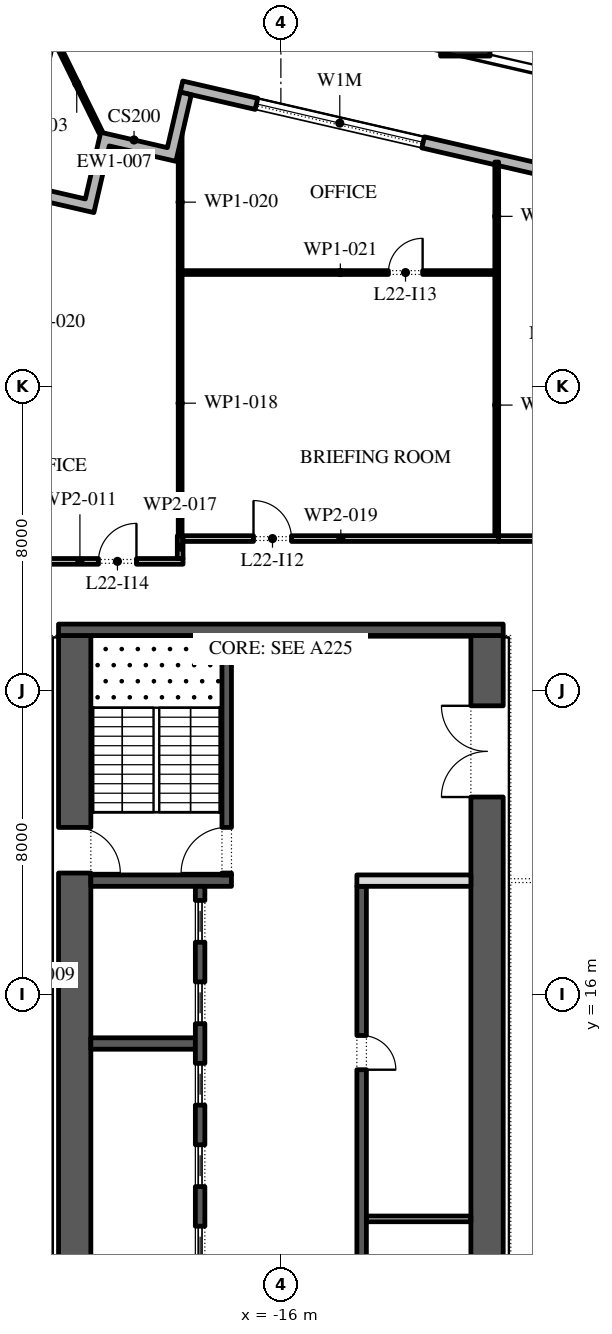
"""IFC4 building model, lengths in metres.
Left out: names, types, materials, properties, quantities, classifications, styles, units other than length and angle.
Written with IfcOpenShell. Run it as: python <this file> out.ifc"""

import sys

from ifc_helpers import new_model, si_unit, direction, frame, frame_2d, origin, origin_2d, place, context, subcontext, project, spatial, polyline, rectangle, outline, extrude, element, fill, save


model = new_model("IFC4")
c1 = context("Model", 3, precision=1e-05, world=origin(), true_north=direction((0.0, 1.0)))
c2 = subcontext(c1, "Body", "Model", "MODEL_VIEW")
j1 = project(units=[si_unit("LENGTHUNIT", "METRE"), si_unit("PLANEANGLEUNIT", "RADIAN")], contexts=[c1])
p1 = place(None, origin())
s1 = spatial("IfcSite", under=j1, at=p1, CompositionType="ELEMENT")
p2 = place(p1, origin())
s2 = spatial("IfcBuilding", under=s1, at=p2, CompositionType="ELEMENT")
p3 = place(p2, frame((0.0, 0.0, 105.6)))
s3 = spatial("IfcBuildingStorey", under=s2, at=p3, CompositionType="ELEMENT", Elevation=105.6)
p4 = place(p3, frame((-11.147, 41.346, 0.0), z_axis=(0.020377597275, 0.088167842757, 0.995897175934), x_axis=(-0.97431566651, 0.225186549318, 0.0)))
e1 = element("IfcColumn", 1, at=p4, inside=s3, PredefinedType="COLUMN", context=c2, shape_type="SweptSolid", body=[
    extrude(rectangle(XDim=1.3, YDim=1.3, at=origin_2d()), origin(), (0.0, 0.0, 1.0), 4.217),
])
p5 = place(p3, frame((31.078, 28.421, 0.0), z_axis=(0.0, 0.0, 1.0), x_axis=(-0.974370456532, 0.224949357493, 0.0)))
e2 = element("IfcWall", 2, at=p5, inside=s3, PredefinedType="STANDARD", context=c2, shape_type="SweptSolid", body=[
    extrude(rectangle(XDim=51.0, YDim=0.3, at=frame_2d((25.5, 0.0))), origin(), (0.0, 0.0, 1.0), 4.0),
])
p6 = place(p5, frame((1.875, 0.0, 0.45)))
e3 = element("IfcOpeningElement", 3, at=p6, cuts=e2, PredefinedType="OPENING", context=c2, shape_type="SweptSolid", body=[
    extrude(rectangle(XDim=4.5, YDim=3.05, at=frame_2d((2.25, 1.525))), frame((0.0, 0.16, 0.0), z_axis=(0.0, -1.0, 0.0), x_axis=(1.0, 0.0, 0.0)), (0.0, 0.0, 1.0), 0.32),
])
p7 = place(p5, frame((10.275, 0.0, 0.45)))
e4 = element("IfcOpeningElement", 4, at=p7, cuts=e2, PredefinedType="OPENING", context=c2, shape_type="SweptSolid", body=[
    extrude(rectangle(XDim=4.5, YDim=2.95, at=frame_2d((2.25, 1.475))), frame((0.0, 0.16, 0.0), z_axis=(0.0, -1.0, 0.0), x_axis=(1.0, 0.0, 0.0)), (0.0, 0.0, 1.0), 0.32),
])
p8 = place(p5, frame((18.825, 0.0, 0.45)))
e5 = element("IfcOpeningElement", 5, at=p8, cuts=e2, PredefinedType="OPENING", context=c2, shape_type="SweptSolid", body=[
    extrude(rectangle(XDim=4.5, YDim=2.875, at=frame_2d((2.25, 1.438))), frame((0.0, 0.16, 0.0), z_axis=(0.0, -1.0, 0.0), x_axis=(1.0, 0.0, 0.0)), (0.0, 0.0, 1.0), 0.32),
])
p9 = place(p5, frame((27.075, 0.0, 0.0)))
e6 = element("IfcOpeningElement", 6, at=p9, cuts=e2, PredefinedType="OPENING", context=c2, shape_type="SweptSolid", body=[
    extrude(rectangle(XDim=2.4, YDim=3.25, at=frame_2d((1.2, 1.625))), frame((0.0, 0.16, 0.0), z_axis=(0.0, -1.0, 0.0), x_axis=(1.0, 0.0, 0.0)), (0.0, 0.0, 1.0), 0.32),
])
p10 = place(p5, frame((35.925, 0.0, 0.45)))
e7 = element("IfcOpeningElement", 7, at=p10, cuts=e2, PredefinedType="OPENING", context=c2, shape_type="SweptSolid", body=[
    extrude(rectangle(XDim=4.5, YDim=2.675, at=frame_2d((2.25, 1.337))), frame((0.0, 0.16, 0.0), z_axis=(0.0, -1.0, 0.0), x_axis=(1.0, 0.0, 0.0)), (0.0, 0.0, 1.0), 0.32),
])
p11 = place(p5, frame((44.475, 0.0, 0.45)))
e8 = element("IfcOpeningElement", 8, at=p11, cuts=e2, PredefinedType="OPENING", context=c2, shape_type="SweptSolid", body=[
    extrude(rectangle(XDim=4.5, YDim=2.575, at=frame_2d((2.25, 1.288))), frame((0.0, 0.16, 0.0), z_axis=(0.0, -1.0, 0.0), x_axis=(1.0, 0.0, 0.0)), (0.0, 0.0, 1.0), 0.32),
])
p12 = place(p3, origin())
e9 = element("IfcWall", 9, at=p12, inside=s3, PredefinedType="STANDARD", context=c2, shape_type="SweptSolid", body=[
    extrude(outline(polyline([(-22.967, 37.049), (-22.899, 37.342), (-21.145, 36.937), (-20.74, 38.691), (-18.986, 38.286), (-18.649, 39.747), (-18.357, 39.68), (-18.762, 37.926), (-20.515, 38.331), (-20.92, 36.577), (-22.967, 37.049)])), origin(), (0.0, 0.0, 1.0), 4.0),
])
p13 = place(p3, frame((-20.74, 38.691, -0.05), z_axis=(0.0, 0.0, 1.0), x_axis=(-0.441125841368, 0.897445258541, 0.0)))
e10 = element("IfcWall", 10, at=p13, inside=s3, PredefinedType="STANDARD", context=c2, shape_type="SweptSolid", body=[
    extrude(rectangle(XDim=2.86, YDim=0.1, at=frame_2d((1.43, 0.0))), origin(), (0.0, 0.0, 1.0), 4.05),
])
p14 = place(p3, frame((-21.425, -2.45, 0.0), z_axis=(0.0, 0.0, 1.0), x_axis=(0.0, 1.0, 0.0)))
e11 = element("IfcWall", 11, at=p14, inside=s3, PredefinedType="SHEAR", context=c2, shape_type="SweptSolid", body=[
    extrude(rectangle(XDim=27.9, YDim=0.85, at=frame_2d((13.95, 0.0))), origin(), (0.0, 0.0, 1.0), 4.0),
])
p15 = place(p14, frame((5.05, 0.0, 0.0)))
e12 = element("IfcOpeningElement", 12, at=p15, cuts=e11, PredefinedType="OPENING", context=c2, shape_type="SweptSolid", body=[
    extrude(rectangle(XDim=1.2, YDim=2.1, at=frame_2d((0.6, 1.05))), frame((0.0, 0.435, 0.0), z_axis=(0.0, -1.0, 0.0), x_axis=(1.0, 0.0, 0.0)), (0.0, 0.0, 1.0), 0.87),
])
p16 = place(p14, frame((21.65, 0.0, 0.0)))
e13 = element("IfcOpeningElement", 13, at=p16, cuts=e11, PredefinedType="OPENING", context=c2, shape_type="SweptSolid", body=[
    extrude(rectangle(XDim=1.2, YDim=2.1, at=frame_2d((0.6, 1.05))), frame((0.0, 0.435, 0.0), z_axis=(0.0, -1.0, 0.0), x_axis=(1.0, 0.0, 0.0)), (0.0, 0.0, 1.0), 0.87),
])
p17 = place(p3, frame((-10.575, -2.45, 0.0), z_axis=(0.0, 0.0, 1.0), x_axis=(0.0, 1.0, 0.0)))
e14 = element("IfcWall", 14, at=p17, inside=s3, PredefinedType="SHEAR", context=c2, shape_type="SweptSolid", body=[
    extrude(rectangle(XDim=27.9, YDim=0.85, at=frame_2d((13.95, 0.0))), origin(), (0.0, 0.0, 1.0), 4.0),
])
p18 = place(p17, frame((23.65, 0.0, 0.0)))
e15 = element("IfcOpeningElement", 15, at=p18, cuts=e14, PredefinedType="OPENING", context=c2, shape_type="SweptSolid", body=[
    extrude(rectangle(XDim=2.4, YDim=2.1, at=frame_2d((1.2, 1.05))), frame((0.0, 0.435, 0.0), z_axis=(0.0, -1.0, 0.0), x_axis=(1.0, 0.0, 0.0)), (0.0, 0.0, 1.0), 0.87),
])
p19 = place(p17, frame((1.087, 0.0, 0.0)))
e16 = element("IfcOpeningElement", 16, at=p19, cuts=e14, PredefinedType="OPENING", context=c2, shape_type="SweptSolid", body=[
    extrude(rectangle(XDim=0.9, YDim=2.1, at=frame_2d((0.45, 1.05))), frame((0.0, 0.435, 0.0), z_axis=(0.0, -1.0, 0.0), x_axis=(1.0, 0.0, 0.0)), (0.0, 0.0, 1.0), 0.87),
])
p20 = place(p17, frame((4.262, 0.0, 0.0)))
e17 = element("IfcOpeningElement", 17, at=p20, cuts=e14, PredefinedType="OPENING", context=c2, shape_type="SweptSolid", body=[
    extrude(rectangle(XDim=1.0, YDim=2.1, at=frame_2d((0.5, 1.05))), frame((0.0, 0.435, 0.0), z_axis=(0.0, -1.0, 0.0), x_axis=(1.0, 0.0, 0.0)), (0.0, 0.0, 1.0), 0.87),
])
p21 = place(p3, frame((-21.85, 25.6, 0.0), z_axis=(0.0, 0.0, 1.0), x_axis=(1.0, 0.0, 0.0)))
e18 = element("IfcWall", 18, at=p21, inside=s3, PredefinedType="SHEAR", context=c2, shape_type="SweptSolid", body=[
    extrude(rectangle(XDim=11.7, YDim=0.3, at=frame_2d((5.85, 0.0))), origin(), (0.0, 0.0, 1.0), 4.0),
])
p22 = place(p3, frame((-21.0, 19.0, 0.0), z_axis=(0.0, 0.0, 1.0), x_axis=(1.0, 0.0, 0.0)))
e19 = element("IfcWall", 19, at=p22, inside=s3, PredefinedType="SHEAR", context=c2, shape_type="SweptSolid", body=[
    extrude(rectangle(XDim=3.7, YDim=0.3, at=frame_2d((1.85, 0.0))), origin(), (0.0, 0.0, 1.0), 4.0),
])
p23 = place(p3, frame((-17.425, 19.15, 0.0), z_axis=(0.0, 0.0, 1.0), x_axis=(0.0, 1.0, 0.0)))
e20 = element("IfcWall", 20, at=p23, inside=s3, PredefinedType="SHEAR", context=c2, shape_type="SweptSolid", body=[
    extrude(rectangle(XDim=6.3, YDim=0.25, at=frame_2d((3.15, 0.0))), origin(), (0.0, 0.0, 1.0), 4.0),
])
p24 = place(p23, frame((0.05, 0.0, 0.0)))
e21 = element("IfcOpeningElement", 21, at=p24, cuts=e20, PredefinedType="OPENING", context=c2, shape_type="SweptSolid", body=[
    extrude(rectangle(XDim=1.2, YDim=2.1, at=frame_2d((0.6, 1.05))), frame((0.0, 0.135, 0.0), z_axis=(0.0, -1.0, 0.0), x_axis=(1.0, 0.0, 0.0)), (0.0, 0.0, 1.0), 0.27),
])
p25 = place(p3, frame((-21.0, 14.714, 0.0), z_axis=(0.0, 0.0, 1.0), x_axis=(1.0, 0.0, 0.0)))
e22 = element("IfcWall", 22, at=p25, inside=s3, PredefinedType="SHEAR", context=c2, shape_type="SweptSolid", body=[
    extrude(rectangle(XDim=2.75, YDim=0.3, at=frame_2d((1.375, 0.0))), origin(), (0.0, 0.0, 1.0), 4.0),
])
p26 = place(p3, frame((-18.125, 4.15, 0.0), z_axis=(0.0, 0.0, 1.0), x_axis=(0.0, 1.0, 0.0)))
e23 = element("IfcWall", 23, at=p26, inside=s3, PredefinedType="SHEAR", context=c2, shape_type="SweptSolid", body=[
    extrude(rectangle(XDim=14.7, YDim=0.25, at=frame_2d((7.35, 0.0))), origin(), (0.0, 0.0, 1.0), 4.0),
])
p27 = place(p26, frame((0.371, 0.0, 0.0)))
e24 = element("IfcOpeningElement", 24, at=p27, cuts=e23, PredefinedType="OPENING", context=c2, shape_type="SweptSolid", body=[
    extrude(rectangle(XDim=1.1, YDim=2.1, at=frame_2d((0.55, 1.05))), frame((0.0, 0.135, 0.0), z_axis=(0.0, -1.0, 0.0), x_axis=(1.0, 0.0, 0.0)), (0.0, 0.0, 1.0), 0.27),
])
p28 = place(p26, frame((2.514, 0.0, 0.0)))
e25 = element("IfcOpeningElement", 25, at=p28, cuts=e23, PredefinedType="OPENING", context=c2, shape_type="SweptSolid", body=[
    extrude(rectangle(XDim=1.1, YDim=2.1, at=frame_2d((0.55, 1.05))), frame((0.0, 0.135, 0.0), z_axis=(0.0, -1.0, 0.0), x_axis=(1.0, 0.0, 0.0)), (0.0, 0.0, 1.0), 0.27),
])
p29 = place(p26, frame((4.657, 0.0, 0.0)))
e26 = element("IfcOpeningElement", 26, at=p29, cuts=e23, PredefinedType="OPENING", context=c2, shape_type="SweptSolid", body=[
    extrude(rectangle(XDim=1.1, YDim=2.1, at=frame_2d((0.55, 1.05))), frame((0.0, 0.135, 0.0), z_axis=(0.0, -1.0, 0.0), x_axis=(1.0, 0.0, 0.0)), (0.0, 0.0, 1.0), 0.27),
])
p30 = place(p26, frame((6.8, 0.0, 0.0)))
e27 = element("IfcOpeningElement", 27, at=p30, cuts=e23, PredefinedType="OPENING", context=c2, shape_type="SweptSolid", body=[
    extrude(rectangle(XDim=1.1, YDim=2.1, at=frame_2d((0.55, 1.05))), frame((0.0, 0.135, 0.0), z_axis=(0.0, -1.0, 0.0), x_axis=(1.0, 0.0, 0.0)), (0.0, 0.0, 1.0), 0.27),
])
p31 = place(p26, frame((8.943, 0.0, 0.0)))
e28 = element("IfcOpeningElement", 28, at=p31, cuts=e23, PredefinedType="OPENING", context=c2, shape_type="SweptSolid", body=[
    extrude(rectangle(XDim=1.1, YDim=2.1, at=frame_2d((0.55, 1.05))), frame((0.0, 0.135, 0.0), z_axis=(0.0, -1.0, 0.0), x_axis=(1.0, 0.0, 0.0)), (0.0, 0.0, 1.0), 0.27),
])
p32 = place(p26, frame((11.086, 0.0, 0.0)))
e29 = element("IfcOpeningElement", 29, at=p32, cuts=e23, PredefinedType="OPENING", context=c2, shape_type="SweptSolid", body=[
    extrude(rectangle(XDim=1.1, YDim=2.1, at=frame_2d((0.55, 1.05))), frame((0.0, 0.135, 0.0), z_axis=(0.0, -1.0, 0.0), x_axis=(1.0, 0.0, 0.0)), (0.0, 0.0, 1.0), 0.27),
])
p33 = place(p26, frame((13.229, 0.0, 0.0)))
e30 = element("IfcOpeningElement", 30, at=p33, cuts=e23, PredefinedType="OPENING", context=c2, shape_type="SweptSolid", body=[
    extrude(rectangle(XDim=1.1, YDim=2.1, at=frame_2d((0.55, 1.05))), frame((0.0, 0.135, 0.0), z_axis=(0.0, -1.0, 0.0), x_axis=(1.0, 0.0, 0.0)), (0.0, 0.0, 1.0), 0.27),
])
p34 = place(p3, frame((-13.875, -2.45, 0.0), z_axis=(0.0, 0.0, 1.0), x_axis=(0.0, 1.0, 0.0)))
e31 = element("IfcWall", 31, at=p34, inside=s3, PredefinedType="SHEAR", context=c2, shape_type="SweptSolid", body=[
    extrude(rectangle(XDim=21.3, YDim=0.25, at=frame_2d((10.65, 0.0))), origin(), (0.0, 0.0, 1.0), 4.0),
])
p35 = place(p34, frame((10.196, 0.0, 0.0)))
e32 = element("IfcOpeningElement", 32, at=p35, cuts=e31, PredefinedType="OPENING", context=c2, shape_type="SweptSolid", body=[
    extrude(rectangle(XDim=0.9, YDim=2.1, at=frame_2d((0.45, 1.05))), frame((0.0, 0.135, 0.0), z_axis=(0.0, -1.0, 0.0), x_axis=(1.0, 0.0, 0.0)), (0.0, 0.0, 1.0), 0.27),
])
p36 = place(p34, frame((16.475, 0.0, 0.0)))
e33 = element("IfcOpeningElement", 33, at=p36, cuts=e31, PredefinedType="OPENING", context=c2, shape_type="SweptSolid", body=[
    extrude(rectangle(XDim=0.9, YDim=2.1, at=frame_2d((0.45, 1.05))), frame((0.0, 0.135, 0.0), z_axis=(0.0, -1.0, 0.0), x_axis=(1.0, 0.0, 0.0)), (0.0, 0.0, 1.0), 0.27),
])
p37 = place(p34, frame((6.971, 0.0, 0.0)))
e34 = element("IfcOpeningElement", 34, at=p37, cuts=e31, PredefinedType="OPENING", context=c2, shape_type="SweptSolid", body=[
    extrude(rectangle(XDim=1.1, YDim=2.1, at=frame_2d((0.55, 1.05))), frame((0.0, 0.135, 0.0), z_axis=(0.0, -1.0, 0.0), x_axis=(1.0, 0.0, 0.0)), (0.0, 0.0, 1.0), 0.27),
])
p38 = place(p3, frame((-14.0, 19.0, 0.0), z_axis=(0.0, 0.0, 1.0), x_axis=(1.0, 0.0, 0.0)))
e35 = element("IfcWall", 35, at=p38, inside=s3, PredefinedType="PARTITIONING", context=c2, shape_type="SweptSolid", body=[
    extrude(rectangle(XDim=3.0, YDim=0.3, at=frame_2d((1.5, 0.0))), origin(), (0.0, 0.0, 1.0), 4.0),
])
p39 = place(p3, frame((-13.75, 10.1, 0.0), z_axis=(0.0, 0.0, 1.0), x_axis=(1.0, 0.0, 0.0)))
e36 = element("IfcWall", 36, at=p39, inside=s3, PredefinedType="PARTITIONING", context=c2, shape_type="SweptSolid", body=[
    extrude(rectangle(XDim=2.75, YDim=0.15, at=frame_2d((1.375, 0.0))), origin(), (0.0, 0.0, 1.0), 4.0),
])
p40 = place(p3, frame((-24.0, 27.4, 0.0), z_axis=(0.0, 0.0, 1.0), x_axis=(1.0, 0.0, 0.0)))
e37 = element("IfcWall", 37, at=p40, inside=s3, PredefinedType="PARTITIONING", context=c2, shape_type="SweptSolid", body=[
    extrude(rectangle(XDim=5.425, YDim=0.15, at=frame_2d((2.712, 0.0))), origin(), (0.0, 0.0, 1.0), 4.0),
])
p41 = place(p40, frame((3.2, 0.0, 0.0)))
e38 = element("IfcOpeningElement", 38, at=p41, cuts=e37, PredefinedType="OPENING", context=c2, shape_type="SweptSolid", body=[
    extrude(rectangle(XDim=1.0, YDim=2.1, at=frame_2d((0.5, 1.05))), frame((0.0, 0.085, 0.0), z_axis=(0.0, -1.0, 0.0), x_axis=(1.0, 0.0, 0.0)), (0.0, 0.0, 1.0), 0.17),
])
p42 = place(p3, frame((-18.65, 27.475, 0.0), z_axis=(0.0, 0.0, 1.0), x_axis=(0.0, 1.0, 0.0)))
e39 = element("IfcWall", 39, at=p42, inside=s3, PredefinedType="PARTITIONING", context=c2, shape_type="SweptSolid", body=[
    extrude(rectangle(XDim=0.6, YDim=0.15, at=frame_2d((0.3, 0.0))), origin(), (0.0, 0.0, 1.0), 4.0),
])
p43 = place(p3, frame((-18.65, 28.075, 0.0), z_axis=(0.0, 0.0, 1.0), x_axis=(0.0, 1.0, 0.0)))
e40 = element("IfcWall", 40, at=p43, inside=s3, PredefinedType="PARTITIONING", context=c2, shape_type="SweptSolid", body=[
    extrude(rectangle(XDim=6.975, YDim=0.1, at=frame_2d((3.488, 0.0))), origin(), (0.0, 0.0, 1.0), 4.0),
])
p44 = place(p3, frame((-18.575, 28.0, 0.0), z_axis=(0.0, 0.0, 1.0), x_axis=(1.0, 0.0, 0.0)))
e41 = element("IfcWall", 41, at=p44, inside=s3, PredefinedType="PARTITIONING", context=c2, shape_type="SweptSolid", body=[
    extrude(rectangle(XDim=8.305, YDim=0.15, at=frame_2d((4.152, 0.0))), origin(), (0.0, 0.0, 1.0), 4.0),
])
p45 = place(p44, frame((1.855, 0.0, 0.0)))
e42 = element("IfcOpeningElement", 42, at=p45, cuts=e41, PredefinedType="OPENING", context=c2, shape_type="SweptSolid", body=[
    extrude(rectangle(XDim=1.0, YDim=2.1, at=frame_2d((0.5, 1.05))), frame((0.0, 0.085, 0.0), z_axis=(0.0, -1.0, 0.0), x_axis=(1.0, 0.0, 0.0)), (0.0, 0.0, 1.0), 0.17),
])
p46 = place(p3, frame((-18.65, 35.05, 0.0), z_axis=(0.0, 0.0, 1.0), x_axis=(0.0, 1.0, 0.0)))
e43 = element("IfcWall", 43, at=p46, inside=s3, PredefinedType="PARTITIONING", context=c2, shape_type="SweptSolid", body=[
    extrude(rectangle(XDim=3.604, YDim=0.1, at=frame_2d((1.802, 0.0))), origin(), (0.0, 0.0, 1.0), 4.0),
])
p47 = place(p3, frame((-18.6, 35.0, 0.0), z_axis=(0.0, 0.0, 1.0), x_axis=(1.0, 0.0, 0.0)))
e44 = element("IfcWall", 44, at=p47, inside=s3, PredefinedType="PARTITIONING", context=c2, shape_type="SweptSolid", body=[
    extrude(rectangle(XDim=8.33, YDim=0.1, at=frame_2d((4.165, 0.0))), origin(), (0.0, 0.0, 1.0), 4.0),
])
p48 = place(p47, frame((5.43, 0.0, 0.0)))
e45 = element("IfcOpeningElement", 45, at=p48, cuts=e44, PredefinedType="OPENING", context=c2, shape_type="SweptSolid", body=[
    extrude(rectangle(XDim=0.9, YDim=2.1, at=frame_2d((0.45, 1.05))), frame((0.0, 0.06, 0.0), z_axis=(0.0, -1.0, 0.0), x_axis=(1.0, 0.0, 0.0)), (0.0, 0.0, 1.0), 0.12),
])
p49 = place(p3, frame((-10.32, 28.075, 0.0), z_axis=(0.0, 0.0, 1.0), x_axis=(0.0, 1.0, 0.0)))
e46 = element("IfcWall", 46, at=p49, inside=s3, PredefinedType="PARTITIONING", context=c2, shape_type="SweptSolid", body=[
    extrude(rectangle(XDim=6.875, YDim=0.1, at=frame_2d((3.438, 0.0))), origin(), (0.0, 0.0, 1.0), 4.0),
])
p50 = place(p3, frame((-10.27, 28.0, 0.0), z_axis=(0.0, 0.0, 1.0), x_axis=(1.0, 0.0, 0.0)))
e47 = element("IfcWall", 47, at=p50, inside=s3, PredefinedType="PARTITIONING", context=c2, shape_type="SweptSolid", body=[
    extrude(rectangle(XDim=4.005, YDim=0.15, at=frame_2d((2.002, 0.0))), origin(), (0.0, 0.0, 1.0), 4.0),
])
p51 = place(p50, frame((1.78, 0.0, 0.0)))
e48 = element("IfcOpeningElement", 48, at=p51, cuts=e47, PredefinedType="OPENING", context=c2, shape_type="SweptSolid", body=[
    extrude(rectangle(XDim=1.0, YDim=2.1, at=frame_2d((0.5, 1.05))), frame((0.0, 0.085, 0.0), z_axis=(0.0, -1.0, 0.0), x_axis=(1.0, 0.0, 0.0)), (0.0, 0.0, 1.0), 0.17),
])
p52 = place(p3, frame((-10.32, 35.05, 0.0), z_axis=(0.0, 0.0, 1.0), x_axis=(0.0, 1.0, 0.0)))
e49 = element("IfcWall", 49, at=p52, inside=s3, PredefinedType="PARTITIONING", context=c2, shape_type="SweptSolid", body=[
    extrude(rectangle(XDim=2.857, YDim=0.1, at=frame_2d((1.428, 0.0))), origin(), (0.0, 0.0, 1.0), 4.0),
])
p53 = place(p11, origin())
e50 = element("IfcWindow", 50, at=p53, inside=s3, PartitioningType="DOUBLE_PANEL_VERTICAL", PredefinedType="WINDOW", context=c2, shape_type="SweptSolid", body=[
    extrude(rectangle(XDim=4.5, YDim=2.575, at=frame_2d((2.25, 1.288))), frame((0.0, 0.03, 0.0), z_axis=(0.0, -1.0, 0.0), x_axis=(1.0, 0.0, 0.0)), (0.0, 0.0, 1.0), 0.06),
])
fill(e8, e50)
p54 = place(p29, origin())
e51 = element("IfcDoor", 51, at=p54, inside=s3, OperationType="SLIDING_TO_LEFT", PredefinedType="DOOR", context=c2, shape_type="SweptSolid", body=[
    extrude(rectangle(XDim=1.1, YDim=2.1, at=frame_2d((0.55, 1.05))), frame((0.0, 0.025, 0.0), z_axis=(0.0, -1.0, 0.0), x_axis=(1.0, 0.0, 0.0)), (0.0, 0.0, 1.0), 0.05),
])
fill(e26, e51)
p55 = place(p30, origin())
e52 = element("IfcDoor", 52, at=p55, inside=s3, OperationType="SLIDING_TO_LEFT", PredefinedType="DOOR", context=c2, shape_type="SweptSolid", body=[
    extrude(rectangle(XDim=1.1, YDim=2.1, at=frame_2d((0.55, 1.05))), frame((0.0, 0.025, 0.0), z_axis=(0.0, -1.0, 0.0), x_axis=(1.0, 0.0, 0.0)), (0.0, 0.0, 1.0), 0.05),
])
fill(e27, e52)
p56 = place(p31, origin())
e53 = element("IfcDoor", 53, at=p56, inside=s3, OperationType="SLIDING_TO_LEFT", PredefinedType="DOOR", context=c2, shape_type="SweptSolid", body=[
    extrude(rectangle(XDim=1.1, YDim=2.1, at=frame_2d((0.55, 1.05))), frame((0.0, 0.025, 0.0), z_axis=(0.0, -1.0, 0.0), x_axis=(1.0, 0.0, 0.0)), (0.0, 0.0, 1.0), 0.05),
])
fill(e28, e53)
p57 = place(p32, origin())
e54 = element("IfcDoor", 54, at=p57, inside=s3, OperationType="SLIDING_TO_LEFT", PredefinedType="DOOR", context=c2, shape_type="SweptSolid", body=[
    extrude(rectangle(XDim=1.1, YDim=2.1, at=frame_2d((0.55, 1.05))), frame((0.0, 0.025, 0.0), z_axis=(0.0, -1.0, 0.0), x_axis=(1.0, 0.0, 0.0)), (0.0, 0.0, 1.0), 0.05),
])
fill(e29, e54)
p58 = place(p33, origin())
e55 = element("IfcDoor", 55, at=p58, inside=s3, OperationType="SLIDING_TO_LEFT", PredefinedType="DOOR", context=c2, shape_type="SweptSolid", body=[
    extrude(rectangle(XDim=1.1, YDim=2.1, at=frame_2d((0.55, 1.05))), frame((0.0, 0.025, 0.0), z_axis=(0.0, -1.0, 0.0), x_axis=(1.0, 0.0, 0.0)), (0.0, 0.0, 1.0), 0.05),
])
fill(e30, e55)
p59 = place(p36, frame((0.9, -0.2, 0.0), z_axis=(0.0, 0.0, 1.0), x_axis=(-1.0, 0.0, 0.0)))
e56 = element("IfcDoor", 56, at=p59, inside=s3, OperationType="SINGLE_SWING_LEFT", PredefinedType="DOOR", context=c2, shape_type="SweptSolid", body=[
    extrude(rectangle(XDim=0.9, YDim=2.1, at=frame_2d((0.45, 1.05))), frame((0.0, -0.075, 0.0), z_axis=(0.0, -1.0, 0.0), x_axis=(1.0, 0.0, 0.0)), (0.0, 0.0, 1.0), 0.05),
])
fill(e33, e56)
p60 = place(p18, origin())
e57 = element("IfcDoor", 57, at=p60, inside=s3, OperationType="DOUBLE_DOOR_SINGLE_SWING", PredefinedType="DOOR", context=c2, shape_type="SweptSolid", body=[
    extrude(rectangle(XDim=2.4, YDim=2.1, at=frame_2d((1.2, 1.05))), frame((0.0, 0.025, 0.0), z_axis=(0.0, -1.0, 0.0), x_axis=(1.0, 0.0, 0.0)), (0.0, 0.0, 1.0), 0.05),
])
fill(e15, e57)
p61 = place(p24, origin())
e58 = element("IfcDoor", 58, at=p61, inside=s3, OperationType="SINGLE_SWING_RIGHT", PredefinedType="DOOR", context=c2, shape_type="SweptSolid", body=[
    extrude(rectangle(XDim=1.2, YDim=2.1, at=frame_2d((0.6, 1.05))), frame((0.0, 0.025, 0.0), z_axis=(0.0, -1.0, 0.0), x_axis=(1.0, 0.0, 0.0)), (0.0, 0.0, 1.0), 0.05),
])
fill(e21, e58)
p62 = place(p16, frame((1.2, 0.0, 0.0), z_axis=(0.0, 0.0, 1.0), x_axis=(-1.0, 0.0, 0.0)))
e59 = element("IfcDoor", 59, at=p62, inside=s3, OperationType="SINGLE_SWING_LEFT", PredefinedType="DOOR", context=c2, shape_type="SweptSolid", body=[
    extrude(rectangle(XDim=1.2, YDim=2.1, at=frame_2d((0.6, 1.05))), frame((0.0, 0.025, 0.0), z_axis=(0.0, -1.0, 0.0), x_axis=(1.0, 0.0, 0.0)), (0.0, 0.0, 1.0), 0.05),
])
fill(e13, e59)
p63 = place(p45, origin())
e60 = element("IfcDoor", 60, at=p63, inside=s3, OperationType="SINGLE_SWING_RIGHT", PredefinedType="DOOR", context=c2, shape_type="SweptSolid", body=[
    extrude(rectangle(XDim=1.0, YDim=2.1, at=frame_2d((0.5, 1.05))), frame((0.0, 0.025, 0.0), z_axis=(0.0, -1.0, 0.0), x_axis=(1.0, 0.0, 0.0)), (0.0, 0.0, 1.0), 0.05),
])
fill(e42, e60)
p64 = place(p48, origin())
e61 = element("IfcDoor", 61, at=p64, inside=s3, OperationType="SINGLE_SWING_LEFT", PredefinedType="DOOR", context=c2, shape_type="SweptSolid", body=[
    extrude(rectangle(XDim=0.9, YDim=2.1, at=frame_2d((0.45, 1.05))), frame((0.0, 0.025, 0.0), z_axis=(0.0, -1.0, 0.0), x_axis=(1.0, 0.0, 0.0)), (0.0, 0.0, 1.0), 0.05),
])
fill(e45, e61)
p65 = place(p41, origin())
e62 = element("IfcDoor", 62, at=p65, inside=s3, OperationType="SINGLE_SWING_LEFT", PredefinedType="DOOR", context=c2, shape_type="SweptSolid", body=[
    extrude(rectangle(XDim=1.0, YDim=2.1, at=frame_2d((0.5, 1.05))), frame((0.0, 0.025, 0.0), z_axis=(0.0, -1.0, 0.0), x_axis=(1.0, 0.0, 0.0)), (0.0, 0.0, 1.0), 0.05),
])
fill(e38, e62)
save(model, sys.argv[1])
